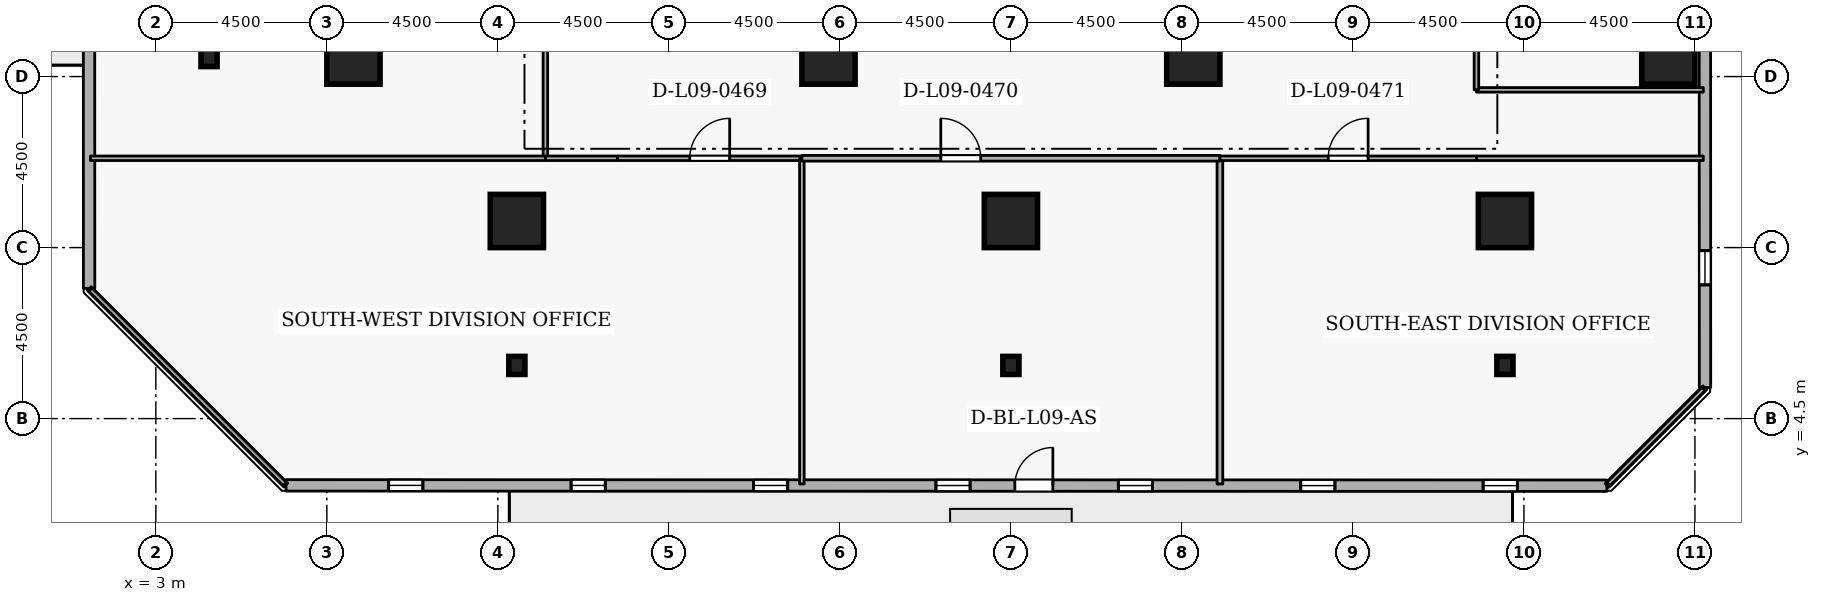
"""IFC4 building model, lengths in metres.
Left out: names, types, materials, properties, quantities, classifications, styles, units other than length and angle.
Written with IfcOpenShell. Run it as: python <this file> out.ifc"""

import sys

from ifc_helpers import new_model, si_unit, direction, frame, frame_2d, origin, origin_2d, place, context, subcontext, project, spatial, rectangle, i_section, extrude, element, fill, save


model = new_model("IFC4")
c1 = context("Model", 3, precision=1e-05, world=origin(), true_north=direction((0.0, 1.0)))
c2 = subcontext(c1, "Body", "Model", "MODEL_VIEW")
j1 = project(units=[si_unit("LENGTHUNIT", "METRE"), si_unit("PLANEANGLEUNIT", "RADIAN")], contexts=[c1])
p1 = place(None, origin())
s1 = spatial("IfcSite", under=j1, at=p1, CompositionType="ELEMENT")
p2 = place(p1, origin())
s2 = spatial("IfcBuilding", under=s1, at=p2, CompositionType="ELEMENT")
p3 = place(p2, frame((0.0, 0.0, 38.7)))
s3 = spatial("IfcBuildingStorey", under=s2, at=p3, CompositionType="ELEMENT", Elevation=38.7)
for number, where, z_axis, x_axis in (
    (1, (12.5, 9.7, 0.0), (0.0, 0.0, 1.0), (1.0, 0.0, 0.0)),
    (2, (25.5, 9.7, 0.0), (0.0, 0.0, 1.0), (1.0, 0.0, 0.0)),
    (3, (38.5, 9.7, 0.0), (0.0, 0.0, 1.0), (1.0, 0.0, 0.0)),
    (4, (42.8, 14.0, 0.0), (0.0, 0.0, 1.0), (1.0, 0.0, 0.0)),
    (5, (8.2, 14.0, 0.0), (0.0, 0.0, 1.0), (1.0, 0.0, 0.0)),
    (6, (20.7, 14.0, 0.0), (0.0, 0.0, 1.0), (1.0, 0.0, 0.0)),
    (7, (30.3, 14.0, 0.0), (0.0, 0.0, 1.0), (1.0, 0.0, 0.0)),
):
    element("IfcColumn", number, at=place(p3, frame(where, z_axis=z_axis, x_axis=x_axis)), inside=s3, PredefinedType="COLUMN", context=c2, shape_type="SweptSolid", body=[
        extrude(rectangle(XDim=1.4, YDim=1.4, at=origin_2d()), origin(), (0.0, 0.0, 1.0), 3.6),
    ])
for number, where, z_axis, x_axis in (
    (8, (12.5, 5.9, 0.0), (0.0, 0.0, 1.0), (1.0, 0.0, 0.0)),
    (9, (25.5, 5.9, 0.0), (0.0, 0.0, 1.0), (1.0, 0.0, 0.0)),
    (10, (38.5, 5.9, 0.0), (0.0, 0.0, 1.0), (1.0, 0.0, 0.0)),
    (11, (4.4, 14.0, 0.0), (0.0, 0.0, 1.0), (1.0, 0.0, 0.0)),
):
    element("IfcColumn", number, at=place(p3, frame(where, z_axis=z_axis, x_axis=x_axis)), inside=s3, PredefinedType="COLUMN", context=c2, shape_type="SweptSolid", body=[
        extrude(i_section(OverallWidth=0.424, OverallDepth=0.475, WebThickness=0.048, FlangeThickness=0.077, FilletRadius=0.015, at=origin_2d()), origin(), (0.0, 0.0, 1.0), 3.6),
    ])
p4 = place(p3, frame((6.427, 2.744, 0.0), z_axis=(0.0, 0.0, 1.0), x_axis=(0.999999969775, -0.000245864205, 0.0)))
e12 = element("IfcWall", 12, at=p4, inside=s3, PredefinedType="STANDARD", context=c2, shape_type="SweptSolid", body=[
    extrude(rectangle(XDim=34.755, YDim=0.3, at=frame_2d((17.377, 0.0))), origin(), (0.0, 0.0, 1.0), 2.7),
])
p5 = place(p4, frame((19.177, 0.0, 0.0)))
e13 = element("IfcOpeningElement", 13, at=p5, cuts=e12, PredefinedType="OPENING", context=c2, shape_type="SweptSolid", body=[
    extrude(rectangle(XDim=1.0, YDim=2.08, at=frame_2d((0.5, 1.04))), frame((0.0, 0.16, 0.0), z_axis=(0.0, -1.0, 0.0), x_axis=(1.0, 0.0, 0.0)), (0.0, 0.0, 1.0), 0.32),
])
p6 = place(p4, frame((2.7, 0.0, 0.72)))
e14 = element("IfcOpeningElement", 14, at=p6, cuts=e12, PredefinedType="OPENING", context=c2, shape_type="SweptSolid", body=[
    extrude(rectangle(XDim=0.9, YDim=1.75, at=frame_2d((0.45, 0.875))), frame((0.0, 0.16, 0.0), z_axis=(0.0, -1.0, 0.0), x_axis=(1.0, 0.0, 0.0)), (0.0, 0.0, 1.0), 0.32),
])
p7 = place(p4, frame((7.5, 0.0, 0.72)))
e15 = element("IfcOpeningElement", 15, at=p7, cuts=e12, PredefinedType="OPENING", context=c2, shape_type="SweptSolid", body=[
    extrude(rectangle(XDim=0.9, YDim=1.75, at=frame_2d((0.45, 0.875))), frame((0.0, 0.16, 0.0), z_axis=(0.0, -1.0, 0.0), x_axis=(1.0, 0.0, 0.0)), (0.0, 0.0, 1.0), 0.32),
])
p8 = place(p4, frame((12.3, 0.0, 0.72)))
e16 = element("IfcOpeningElement", 16, at=p8, cuts=e12, PredefinedType="OPENING", context=c2, shape_type="SweptSolid", body=[
    extrude(rectangle(XDim=0.9, YDim=1.75, at=frame_2d((0.45, 0.875))), frame((0.0, 0.16, 0.0), z_axis=(0.0, -1.0, 0.0), x_axis=(1.0, 0.0, 0.0)), (0.0, 0.0, 1.0), 0.32),
])
p9 = place(p4, frame((17.1, 0.0, 0.72)))
e17 = element("IfcOpeningElement", 17, at=p9, cuts=e12, PredefinedType="OPENING", context=c2, shape_type="SweptSolid", body=[
    extrude(rectangle(XDim=0.9, YDim=1.75, at=frame_2d((0.45, 0.875))), frame((0.0, 0.16, 0.0), z_axis=(0.0, -1.0, 0.0), x_axis=(1.0, 0.0, 0.0)), (0.0, 0.0, 1.0), 0.32),
])
p10 = place(p4, frame((21.9, 0.0, 0.72)))
e18 = element("IfcOpeningElement", 18, at=p10, cuts=e12, PredefinedType="OPENING", context=c2, shape_type="SweptSolid", body=[
    extrude(rectangle(XDim=0.9, YDim=1.75, at=frame_2d((0.45, 0.875))), frame((0.0, 0.16, 0.0), z_axis=(0.0, -1.0, 0.0), x_axis=(1.0, 0.0, 0.0)), (0.0, 0.0, 1.0), 0.32),
])
p11 = place(p4, frame((26.7, 0.0, 0.72)))
e19 = element("IfcOpeningElement", 19, at=p11, cuts=e12, PredefinedType="OPENING", context=c2, shape_type="SweptSolid", body=[
    extrude(rectangle(XDim=0.9, YDim=1.75, at=frame_2d((0.45, 0.875))), frame((0.0, 0.16, 0.0), z_axis=(0.0, -1.0, 0.0), x_axis=(1.0, 0.0, 0.0)), (0.0, 0.0, 1.0), 0.32),
])
p12 = place(p4, frame((31.5, 0.0, 0.72)))
e20 = element("IfcOpeningElement", 20, at=p12, cuts=e12, PredefinedType="OPENING", context=c2, shape_type="SweptSolid", body=[
    extrude(rectangle(XDim=0.9, YDim=1.75, at=frame_2d((0.45, 0.875))), frame((0.0, 0.16, 0.0), z_axis=(0.0, -1.0, 0.0), x_axis=(1.0, 0.0, 0.0)), (0.0, 0.0, 1.0), 0.32),
])
p13 = place(p3, frame((43.765, 5.319, 0.0), z_axis=(0.0, 0.0, 1.0), x_axis=(-0.000245864205, 0.999999969775, 0.0)))
e21 = element("IfcWall", 21, at=p13, inside=s3, PredefinedType="STANDARD", context=c2, shape_type="SweptSolid", body=[
    extrude(rectangle(XDim=34.755, YDim=0.3, at=frame_2d((17.377, 0.0))), origin(), (0.0, 0.0, 1.0), 2.7),
])
p14 = place(p13, frame((2.7, 0.0, 0.72)))
e22 = element("IfcOpeningElement", 22, at=p14, cuts=e21, PredefinedType="OPENING", context=c2, shape_type="SweptSolid", body=[
    extrude(rectangle(XDim=0.9, YDim=1.75, at=frame_2d((0.45, 0.875))), frame((0.0, 0.16, 0.0), z_axis=(0.0, -1.0, 0.0), x_axis=(1.0, 0.0, 0.0)), (0.0, 0.0, 1.0), 0.32),
])
p15 = place(p13, frame((12.3, 0.0, 0.72)))
e23 = element("IfcOpeningElement", 23, at=p15, cuts=e21, PredefinedType="OPENING", context=c2, shape_type="SweptSolid", body=[
    extrude(rectangle(XDim=0.9, YDim=1.75, at=frame_2d((0.45, 0.875))), frame((0.0, 0.16, 0.0), z_axis=(0.0, -1.0, 0.0), x_axis=(1.0, 0.0, 0.0)), (0.0, 0.0, 1.0), 0.32),
])
p16 = place(p13, frame((17.1, 0.0, 0.72)))
e24 = element("IfcOpeningElement", 24, at=p16, cuts=e21, PredefinedType="OPENING", context=c2, shape_type="SweptSolid", body=[
    extrude(rectangle(XDim=0.9, YDim=1.75, at=frame_2d((0.45, 0.875))), frame((0.0, 0.16, 0.0), z_axis=(0.0, -1.0, 0.0), x_axis=(1.0, 0.0, 0.0)), (0.0, 0.0, 1.0), 0.32),
])
p17 = place(p13, frame((26.7, 0.0, 0.72)))
e25 = element("IfcOpeningElement", 25, at=p17, cuts=e21, PredefinedType="OPENING", context=c2, shape_type="SweptSolid", body=[
    extrude(rectangle(XDim=0.9, YDim=1.75, at=frame_2d((0.45, 0.875))), frame((0.0, 0.16, 0.0), z_axis=(0.0, -1.0, 0.0), x_axis=(1.0, 0.0, 0.0)), (0.0, 0.0, 1.0), 0.32),
])
p18 = place(p13, frame((31.5, 0.0, 0.72)))
e26 = element("IfcOpeningElement", 26, at=p18, cuts=e21, PredefinedType="OPENING", context=c2, shape_type="SweptSolid", body=[
    extrude(rectangle(XDim=0.9, YDim=1.75, at=frame_2d((0.45, 0.875))), frame((0.0, 0.16, 0.0), z_axis=(0.0, -1.0, 0.0), x_axis=(1.0, 0.0, 0.0)), (0.0, 0.0, 1.0), 0.32),
])
p19 = place(p3, frame((1.235, 42.681, 0.0), z_axis=(0.0, 0.0, 1.0), x_axis=(0.000245864205, -0.999999969775, 0.0)))
e27 = element("IfcWall", 27, at=p19, inside=s3, PredefinedType="STANDARD", context=c2, shape_type="SweptSolid", body=[
    extrude(rectangle(XDim=34.755, YDim=0.3, at=frame_2d((17.377, 0.0))), origin(), (0.0, 0.0, 1.0), 2.7),
])
p20 = place(p19, frame((19.177, 0.0, 0.0)))
e28 = element("IfcOpeningElement", 28, at=p20, cuts=e27, PredefinedType="OPENING", context=c2, shape_type="SweptSolid", body=[
    extrude(rectangle(XDim=1.0, YDim=2.08, at=frame_2d((0.5, 1.04))), frame((0.0, 0.16, 0.0), z_axis=(0.0, -1.0, 0.0), x_axis=(1.0, 0.0, 0.0)), (0.0, 0.0, 1.0), 0.32),
])
p21 = place(p19, frame((2.7, 0.0, 0.72)))
e29 = element("IfcOpeningElement", 29, at=p21, cuts=e27, PredefinedType="OPENING", context=c2, shape_type="SweptSolid", body=[
    extrude(rectangle(XDim=0.9, YDim=1.75, at=frame_2d((0.45, 0.875))), frame((0.0, 0.16, 0.0), z_axis=(0.0, -1.0, 0.0), x_axis=(1.0, 0.0, 0.0)), (0.0, 0.0, 1.0), 0.32),
])
p22 = place(p19, frame((7.5, 0.0, 0.72)))
e30 = element("IfcOpeningElement", 30, at=p22, cuts=e27, PredefinedType="OPENING", context=c2, shape_type="SweptSolid", body=[
    extrude(rectangle(XDim=0.9, YDim=1.75, at=frame_2d((0.45, 0.875))), frame((0.0, 0.16, 0.0), z_axis=(0.0, -1.0, 0.0), x_axis=(1.0, 0.0, 0.0)), (0.0, 0.0, 1.0), 0.32),
])
p23 = place(p19, frame((17.1, 0.0, 0.72)))
e31 = element("IfcOpeningElement", 31, at=p23, cuts=e27, PredefinedType="OPENING", context=c2, shape_type="SweptSolid", body=[
    extrude(rectangle(XDim=0.9, YDim=1.75, at=frame_2d((0.45, 0.875))), frame((0.0, 0.16, 0.0), z_axis=(0.0, -1.0, 0.0), x_axis=(1.0, 0.0, 0.0)), (0.0, 0.0, 1.0), 0.32),
])
p24 = place(p19, frame((21.9, 0.0, 0.72)))
e32 = element("IfcOpeningElement", 32, at=p24, cuts=e27, PredefinedType="OPENING", context=c2, shape_type="SweptSolid", body=[
    extrude(rectangle(XDim=0.9, YDim=1.75, at=frame_2d((0.45, 0.875))), frame((0.0, 0.16, 0.0), z_axis=(0.0, -1.0, 0.0), x_axis=(1.0, 0.0, 0.0)), (0.0, 0.0, 1.0), 0.32),
])
p25 = place(p19, frame((26.7, 0.0, 0.72)))
e33 = element("IfcOpeningElement", 33, at=p25, cuts=e27, PredefinedType="OPENING", context=c2, shape_type="SweptSolid", body=[
    extrude(rectangle(XDim=0.9, YDim=1.75, at=frame_2d((0.45, 0.875))), frame((0.0, 0.16, 0.0), z_axis=(0.0, -1.0, 0.0), x_axis=(1.0, 0.0, 0.0)), (0.0, 0.0, 1.0), 0.32),
])
p26 = place(p3, frame((13.25, 20.7, 0.0), z_axis=(0.0, 0.0, 1.0), x_axis=(0.0, -1.0, 0.0)))
e34 = element("IfcWall", 34, at=p26, inside=s3, PredefinedType="PARTITIONING", context=c2, shape_type="SweptSolid", body=[
    extrude(rectangle(XDim=9.35, YDim=0.12, at=frame_2d((4.675, 0.0))), origin(), (0.0, 0.0, 1.0), 3.34),
])
p27 = place(p26, frame((4.15, 0.0, 0.0)))
e35 = element("IfcOpeningElement", 35, at=p27, cuts=e34, PredefinedType="OPENING", context=c2, shape_type="SweptSolid", body=[
    extrude(rectangle(XDim=1.05, YDim=2.1, at=frame_2d((0.525, 1.05))), frame((0.0, 0.07, 0.0), z_axis=(0.0, -1.0, 0.0), x_axis=(1.0, 0.0, 0.0)), (0.0, 0.0, 1.0), 0.14),
])
p28 = place(p3, frame((13.25, 11.35, 0.0), z_axis=(0.0, 0.0, 1.0), x_axis=(-1.0, 0.0, 0.0)))
e36 = element("IfcWall", 36, at=p28, inside=s3, PredefinedType="PARTITIONING", context=c2, shape_type="SweptSolid", body=[
    extrude(rectangle(XDim=11.97, YDim=0.12, at=frame_2d((5.985, 0.0))), origin(), (0.0, 0.0, 1.0), 3.34),
])
p29 = place(p3, frame((43.72, 13.15, 0.0), z_axis=(0.0, 0.0, 1.0), x_axis=(-1.0, 0.0, 0.0)))
e37 = element("IfcWall", 37, at=p29, inside=s3, PredefinedType="PARTITIONING", context=c2, shape_type="SweptSolid", body=[
    extrude(rectangle(XDim=5.97, YDim=0.12, at=frame_2d((2.985, 0.0))), origin(), (0.0, 0.0, 1.0), 3.34),
])
p30 = place(p3, frame((37.75, 13.15, 0.0), z_axis=(0.0, 0.0, 1.0), x_axis=(0.0, 1.0, 0.0)))
e38 = element("IfcWall", 38, at=p30, inside=s3, PredefinedType="PARTITIONING", context=c2, shape_type="SweptSolid", body=[
    extrude(rectangle(XDim=1.862, YDim=0.12, at=frame_2d((0.931, 0.0))), origin(), (0.0, 0.0, 1.0), 3.34),
])
p31 = place(p3, frame((6.393, 2.78, 0.0), z_axis=(0.0, 0.0, 1.0), x_axis=(-0.707106781187, 0.707106781187, 0.0)))
e39 = element("IfcWall", 39, at=p31, inside=s3, PredefinedType="PARTITIONING", context=c2, shape_type="SweptSolid", body=[
    extrude(rectangle(XDim=7.23, YDim=0.12, at=frame_2d((3.615, 0.0))), origin(), (0.0, 0.0, 1.0), 3.34),
])
p32 = place(p3, frame((13.25, 11.35, 0.0), z_axis=(0.0, 0.0, 1.0), x_axis=(1.0, 0.0, 0.0)))
e40 = element("IfcWall", 40, at=p32, inside=s3, PredefinedType="PARTITIONING", context=c2, shape_type="SweptSolid", body=[
    extrude(rectangle(XDim=1.9, YDim=0.12, at=frame_2d((0.95, 0.0))), origin(), (0.0, 0.0, 1.0), 3.34),
])
p33 = place(p3, frame((15.15, 11.35, 0.0), z_axis=(0.0, 0.0, 1.0), x_axis=(1.0, 0.0, 0.0)))
e41 = element("IfcWall", 41, at=p33, inside=s3, PredefinedType="PARTITIONING", context=c2, shape_type="SweptSolid", body=[
    extrude(rectangle(XDim=4.85, YDim=0.12, at=frame_2d((2.425, 0.0))), origin(), (0.0, 0.0, 1.0), 3.34),
])
p34 = place(p33, frame((1.9, 0.0, 0.0)))
e42 = element("IfcOpeningElement", 42, at=p34, cuts=e41, PredefinedType="OPENING", context=c2, shape_type="SweptSolid", body=[
    extrude(rectangle(XDim=1.05, YDim=2.1, at=frame_2d((0.525, 1.05))), frame((0.0, 0.07, 0.0), z_axis=(0.0, -1.0, 0.0), x_axis=(1.0, 0.0, 0.0)), (0.0, 0.0, 1.0), 0.14),
])
p35 = place(p3, frame((20.0, 11.35, 0.0), z_axis=(0.0, 0.0, 1.0), x_axis=(0.0, -1.0, 0.0)))
e43 = element("IfcWall", 43, at=p35, inside=s3, PredefinedType="PARTITIONING", context=c2, shape_type="SweptSolid", body=[
    extrude(rectangle(XDim=8.57, YDim=0.12, at=frame_2d((4.285, 0.0))), origin(), (0.0, 0.0, 1.0), 3.34),
])
p36 = place(p3, frame((31.0, 11.35, 0.0), z_axis=(0.0, 0.0, 1.0), x_axis=(0.0, -1.0, 0.0)))
e44 = element("IfcWall", 44, at=p36, inside=s3, PredefinedType="PARTITIONING", context=c2, shape_type="SweptSolid", body=[
    extrude(rectangle(XDim=8.57, YDim=0.15, at=frame_2d((4.285, 0.0))), origin(), (0.0, 0.0, 1.0), 3.34),
])
p37 = place(p3, frame((20.0, 11.35, 0.0), z_axis=(0.0, 0.0, 1.0), x_axis=(1.0, 0.0, 0.0)))
e45 = element("IfcWall", 45, at=p37, inside=s3, PredefinedType="PARTITIONING", context=c2, shape_type="SweptSolid", body=[
    extrude(rectangle(XDim=11.0, YDim=0.15, at=frame_2d((5.5, 0.0))), origin(), (0.0, 0.0, 1.0), 3.34),
])
p38 = place(p37, frame((3.655, 0.0, 0.0)))
e46 = element("IfcOpeningElement", 46, at=p38, cuts=e45, PredefinedType="OPENING", context=c2, shape_type="SweptSolid", body=[
    extrude(rectangle(XDim=1.05, YDim=2.1, at=frame_2d((0.525, 1.05))), frame((0.0, 0.085, 0.0), z_axis=(0.0, -1.0, 0.0), x_axis=(1.0, 0.0, 0.0)), (0.0, 0.0, 1.0), 0.17),
])
p39 = place(p3, frame((31.0, 11.35, 0.0), z_axis=(0.0, 0.0, 1.0), x_axis=(1.0, 0.0, 0.0)))
e47 = element("IfcWall", 47, at=p39, inside=s3, PredefinedType="PARTITIONING", context=c2, shape_type="SweptSolid", body=[
    extrude(rectangle(XDim=6.75, YDim=0.12, at=frame_2d((3.375, 0.0))), origin(), (0.0, 0.0, 1.0), 3.34),
])
p40 = place(p39, frame((2.85, 0.0, 0.0)))
e48 = element("IfcOpeningElement", 48, at=p40, cuts=e47, PredefinedType="OPENING", context=c2, shape_type="SweptSolid", body=[
    extrude(rectangle(XDim=1.05, YDim=2.1, at=frame_2d((0.525, 1.05))), frame((0.0, 0.07, 0.0), z_axis=(0.0, -1.0, 0.0), x_axis=(1.0, 0.0, 0.0)), (0.0, 0.0, 1.0), 0.14),
])
p41 = place(p3, frame((37.75, 11.35, 0.0), z_axis=(0.0, 0.0, 1.0), x_axis=(1.0, 0.0, 0.0)))
e49 = element("IfcWall", 49, at=p41, inside=s3, PredefinedType="PARTITIONING", context=c2, shape_type="SweptSolid", body=[
    extrude(rectangle(XDim=5.97, YDim=0.12, at=frame_2d((2.985, 0.0))), origin(), (0.0, 0.0, 1.0), 3.34),
])
p42 = place(p3, frame((43.72, 5.275, 0.0), z_axis=(0.0, 0.0, 1.0), x_axis=(-0.707106781187, -0.707106781187, 0.0)))
e50 = element("IfcWall", 50, at=p42, inside=s3, PredefinedType="PARTITIONING", context=c2, shape_type="SweptSolid", body=[
    extrude(rectangle(XDim=3.528, YDim=0.12, at=frame_2d((1.764, 0.0))), origin(), (0.0, 0.0, 1.0), 3.34),
])
p43 = place(p5, origin())
e51 = element("IfcDoor", 51, at=p43, inside=s3, OperationType="SINGLE_SWING_RIGHT", PredefinedType="DOOR", context=c2, shape_type="SweptSolid", body=[
    extrude(rectangle(XDim=1.0, YDim=2.08, at=frame_2d((0.5, 1.04))), frame((0.0, 0.025, 0.0), z_axis=(0.0, -1.0, 0.0), x_axis=(1.0, 0.0, 0.0)), (0.0, 0.0, 1.0), 0.05),
])
fill(e13, e51)
p44 = place(p6, origin())
e52 = element("IfcWindow", 52, at=p44, inside=s3, PartitioningType="SINGLE_PANEL", PredefinedType="WINDOW", context=c2, shape_type="SweptSolid", body=[
    extrude(rectangle(XDim=0.9, YDim=1.75, at=frame_2d((0.45, 0.875))), frame((0.0, 0.03, 0.0), z_axis=(0.0, -1.0, 0.0), x_axis=(1.0, 0.0, 0.0)), (0.0, 0.0, 1.0), 0.06),
])
fill(e14, e52)
p45 = place(p7, origin())
e53 = element("IfcWindow", 53, at=p45, inside=s3, PartitioningType="SINGLE_PANEL", PredefinedType="WINDOW", context=c2, shape_type="SweptSolid", body=[
    extrude(rectangle(XDim=0.9, YDim=1.75, at=frame_2d((0.45, 0.875))), frame((0.0, 0.03, 0.0), z_axis=(0.0, -1.0, 0.0), x_axis=(1.0, 0.0, 0.0)), (0.0, 0.0, 1.0), 0.06),
])
fill(e15, e53)
p46 = place(p8, origin())
e54 = element("IfcWindow", 54, at=p46, inside=s3, PartitioningType="SINGLE_PANEL", PredefinedType="WINDOW", context=c2, shape_type="SweptSolid", body=[
    extrude(rectangle(XDim=0.9, YDim=1.75, at=frame_2d((0.45, 0.875))), frame((0.0, 0.03, 0.0), z_axis=(0.0, -1.0, 0.0), x_axis=(1.0, 0.0, 0.0)), (0.0, 0.0, 1.0), 0.06),
])
fill(e16, e54)
p47 = place(p9, origin())
e55 = element("IfcWindow", 55, at=p47, inside=s3, PartitioningType="SINGLE_PANEL", PredefinedType="WINDOW", context=c2, shape_type="SweptSolid", body=[
    extrude(rectangle(XDim=0.9, YDim=1.75, at=frame_2d((0.45, 0.875))), frame((0.0, 0.03, 0.0), z_axis=(0.0, -1.0, 0.0), x_axis=(1.0, 0.0, 0.0)), (0.0, 0.0, 1.0), 0.06),
])
fill(e17, e55)
p48 = place(p10, origin())
e56 = element("IfcWindow", 56, at=p48, inside=s3, PartitioningType="SINGLE_PANEL", PredefinedType="WINDOW", context=c2, shape_type="SweptSolid", body=[
    extrude(rectangle(XDim=0.9, YDim=1.75, at=frame_2d((0.45, 0.875))), frame((0.0, 0.03, 0.0), z_axis=(0.0, -1.0, 0.0), x_axis=(1.0, 0.0, 0.0)), (0.0, 0.0, 1.0), 0.06),
])
fill(e18, e56)
p49 = place(p11, origin())
e57 = element("IfcWindow", 57, at=p49, inside=s3, PartitioningType="SINGLE_PANEL", PredefinedType="WINDOW", context=c2, shape_type="SweptSolid", body=[
    extrude(rectangle(XDim=0.9, YDim=1.75, at=frame_2d((0.45, 0.875))), frame((0.0, 0.03, 0.0), z_axis=(0.0, -1.0, 0.0), x_axis=(1.0, 0.0, 0.0)), (0.0, 0.0, 1.0), 0.06),
])
fill(e19, e57)
p50 = place(p12, origin())
e58 = element("IfcWindow", 58, at=p50, inside=s3, PartitioningType="SINGLE_PANEL", PredefinedType="WINDOW", context=c2, shape_type="SweptSolid", body=[
    extrude(rectangle(XDim=0.9, YDim=1.75, at=frame_2d((0.45, 0.875))), frame((0.0, 0.03, 0.0), z_axis=(0.0, -1.0, 0.0), x_axis=(1.0, 0.0, 0.0)), (0.0, 0.0, 1.0), 0.06),
])
fill(e20, e58)
p51 = place(p14, origin())
e59 = element("IfcWindow", 59, at=p51, inside=s3, PartitioningType="SINGLE_PANEL", PredefinedType="WINDOW", context=c2, shape_type="SweptSolid", body=[
    extrude(rectangle(XDim=0.9, YDim=1.75, at=frame_2d((0.45, 0.875))), frame((0.0, 0.03, 0.0), z_axis=(0.0, -1.0, 0.0), x_axis=(1.0, 0.0, 0.0)), (0.0, 0.0, 1.0), 0.06),
])
fill(e22, e59)
p52 = place(p34, origin())
e60 = element("IfcDoor", 60, at=p52, inside=s3, OperationType="SINGLE_SWING_RIGHT", PredefinedType="DOOR", context=c2, shape_type="SweptSolid", body=[
    extrude(rectangle(XDim=1.05, YDim=2.1, at=frame_2d((0.525, 1.05))), frame((0.0, 0.025, 0.0), z_axis=(0.0, -1.0, 0.0), x_axis=(1.0, 0.0, 0.0)), (0.0, 0.0, 1.0), 0.05),
])
fill(e42, e60)
p53 = place(p38, origin())
e61 = element("IfcDoor", 61, at=p53, inside=s3, OperationType="SINGLE_SWING_LEFT", PredefinedType="DOOR", context=c2, shape_type="SweptSolid", body=[
    extrude(rectangle(XDim=1.05, YDim=2.1, at=frame_2d((0.525, 1.05))), frame((0.0, 0.025, 0.0), z_axis=(0.0, -1.0, 0.0), x_axis=(1.0, 0.0, 0.0)), (0.0, 0.0, 1.0), 0.05),
])
fill(e46, e61)
p54 = place(p40, origin())
e62 = element("IfcDoor", 62, at=p54, inside=s3, OperationType="SINGLE_SWING_RIGHT", PredefinedType="DOOR", context=c2, shape_type="SweptSolid", body=[
    extrude(rectangle(XDim=1.05, YDim=2.1, at=frame_2d((0.525, 1.05))), frame((0.0, 0.025, 0.0), z_axis=(0.0, -1.0, 0.0), x_axis=(1.0, 0.0, 0.0)), (0.0, 0.0, 1.0), 0.05),
])
fill(e48, e62)
save(model, sys.argv[1])
